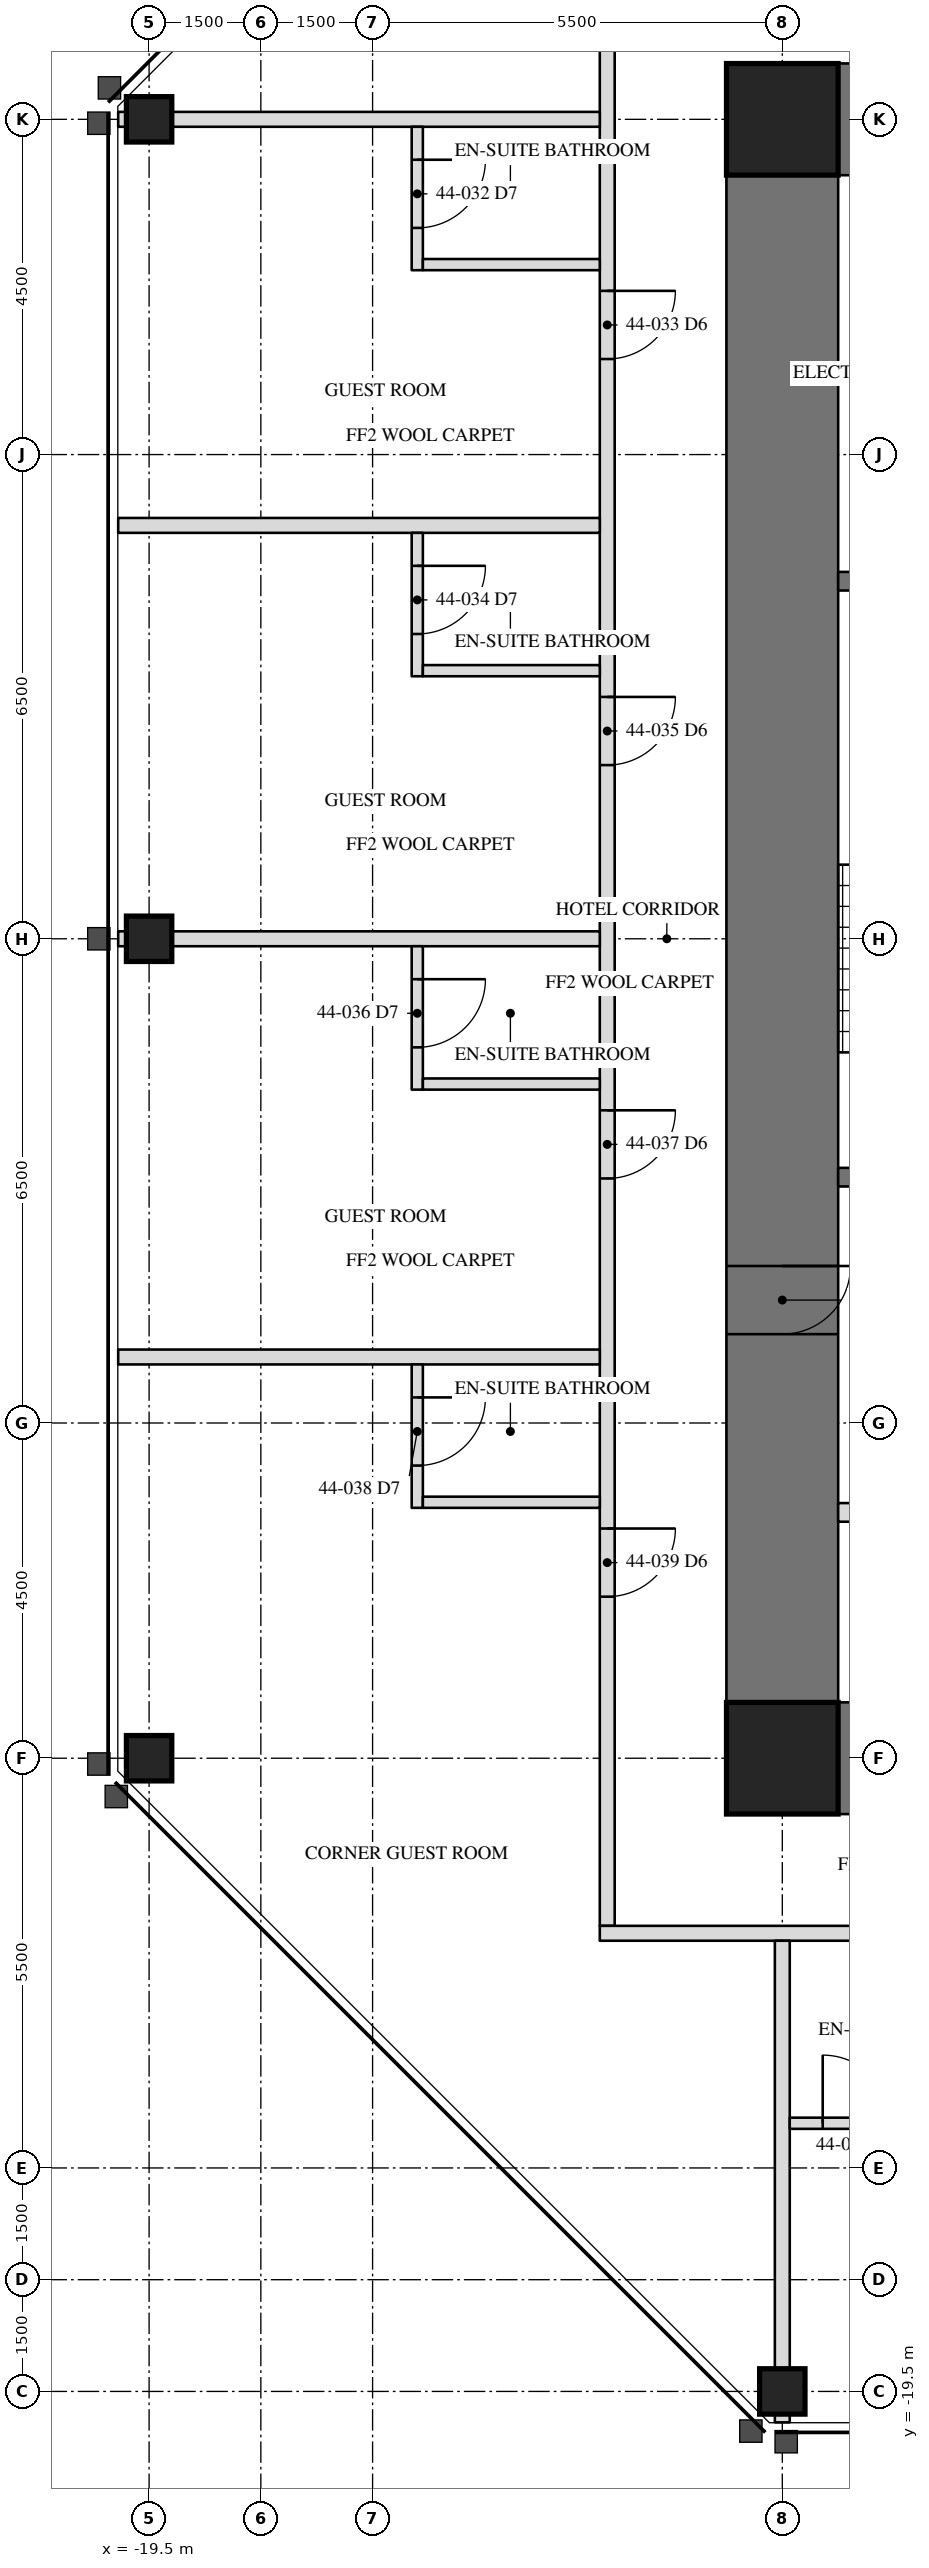
"""IFC4 building model, lengths in metres.
Left out: names, types, materials, properties, quantities, classifications, styles, units other than length and angle.
Written with IfcOpenShell. Run it as: python <this file> out.ifc"""

import sys

from ifc_helpers import new_model, si_unit, direction, frame, frame_2d, origin, origin_2d, place, context, subcontext, project, spatial, rectangle, hollow_rectangle, extrude, element, fill, save


model = new_model("IFC4")
c1 = context("Model", 3, precision=1e-05, world=origin(), true_north=direction((0.0, 1.0)))
c2 = subcontext(c1, "Body", "Model", "MODEL_VIEW")
j1 = project(units=[si_unit("LENGTHUNIT", "METRE"), si_unit("PLANEANGLEUNIT", "RADIAN")], contexts=[c1])
p1 = place(None, origin())
s1 = spatial("IfcSite", under=j1, at=p1, CompositionType="ELEMENT")
p2 = place(p1, origin())
s2 = spatial("IfcBuilding", under=s1, at=p2, CompositionType="ELEMENT")
p3 = place(p2, frame((0.0, 0.0, 190.7)))
s3 = spatial("IfcBuildingStorey", under=s2, at=p3, CompositionType="ELEMENT", Elevation=190.7)
for number, where, z_axis, x_axis in (
    (1, (-19.5, 0.0, 0.0), (0.0, 0.0, 1.0), (0.0, 1.0, 0.0)),
    (2, (-19.5, -11.0, 0.0), (0.0, 0.0, 1.0), (0.0, 1.0, 0.0)),
    (3, (-11.0, -19.5, 0.0), (0.0, 0.0, 1.0), (1.0, 0.0, 0.0)),
    (4, (-19.5, 11.0, 0.0), (0.0, 0.0, 1.0), (0.0, 1.0, 0.0)),
):
    element("IfcColumn", number, at=place(p3, frame(where, z_axis=z_axis, x_axis=x_axis)), inside=s3, PredefinedType="COLUMN", context=c2, shape_type="SweptSolid", body=[
        extrude(hollow_rectangle(XDim=0.61, YDim=0.61, WallThickness=0.076, at=origin_2d()), origin(), (0.0, 0.0, 1.0), 3.5),
    ])
p4 = place(p3, frame((-11.0, 11.0, 0.0), z_axis=(0.0, 0.0, 1.0), x_axis=(0.0, -1.0, 0.0)))
e5 = element("IfcWall", 5, at=p4, inside=s3, PredefinedType="SHEAR", context=c2, shape_type="SweptSolid", body=[
    extrude(rectangle(XDim=22.0, YDim=1.5, at=frame_2d((11.0, 0.0))), origin(), (0.0, 0.0, 1.0), 3.5),
])
p5 = place(p4, frame((15.393, 0.0, 0.0)))
e6 = element("IfcOpeningElement", 6, at=p5, cuts=e5, PredefinedType="OPENING", context=c2, shape_type="SweptSolid", body=[
    extrude(rectangle(XDim=0.915, YDim=2.134, at=frame_2d((0.458, 1.067))), frame((0.0, 0.76, 0.0), z_axis=(0.0, -1.0, 0.0), x_axis=(1.0, 0.0, 0.0)), (0.0, 0.0, 1.0), 1.52),
])
for number, where, z_axis, x_axis in (
    (7, (-6.5, 11.0, 0.0), (0.0, 0.0, 1.0), (-1.0, 0.0, 0.0)),
    (8, (-11.0, -11.0, 0.0), (0.0, 0.0, 1.0), (1.0, 0.0, 0.0)),
):
    element("IfcWall", number, at=place(p3, frame(where, z_axis=z_axis, x_axis=x_axis)), inside=s3, PredefinedType="SHEAR", context=c2, shape_type="SweptSolid", body=[
        extrude(rectangle(XDim=4.5, YDim=1.5, at=frame_2d((2.25, 0.0))), origin(), (0.0, 0.0, 1.0), 3.5),
    ])
for number, where, z_axis, x_axis in (
    (9, (-11.0, 11.0, 0.0), (0.0, 0.0, 1.0), (1.0, 0.0, 0.0)),
    (10, (-11.0, -11.0, 0.0), (0.0, 0.0, 1.0), (1.0, 0.0, 0.0)),
):
    element("IfcColumn", number, at=place(p3, frame(where, z_axis=z_axis, x_axis=x_axis)), inside=s3, PredefinedType="COLUMN", context=c2, shape_type="SweptSolid", body=[
        extrude(hollow_rectangle(XDim=1.499, YDim=1.499, WallThickness=0.102, at=origin_2d()), origin(), (0.0, 0.0, 1.0), 3.5),
    ])
p6 = place(p3, frame((-6.95, 4.8, 0.0), z_axis=(0.0, 0.0, 1.0), x_axis=(-1.0, 0.0, 0.0)))
e11 = element("IfcWall", 11, at=p6, inside=s3, PredefinedType="SOLIDWALL", context=c2, shape_type="SweptSolid", body=[
    extrude(rectangle(XDim=3.3, YDim=0.25, at=frame_2d((1.65, 0.0))), origin(), (0.0, 0.0, 1.0), 3.31),
])
p7 = place(p3, frame((-6.95, -3.2, 0.0), z_axis=(0.0, 0.0, 1.0), x_axis=(-1.0, 0.0, 0.0)))
e12 = element("IfcWall", 12, at=p7, inside=s3, PredefinedType="SOLIDWALL", context=c2, shape_type="SweptSolid", body=[
    extrude(rectangle(XDim=3.3, YDim=0.25, at=frame_2d((1.65, 0.0))), origin(), (0.0, 0.0, 1.0), 3.31),
])
p8 = place(p7, frame((1.116, 0.0, 0.0)))
e13 = element("IfcOpeningElement", 13, at=p8, cuts=e12, PredefinedType="OPENING", context=c2, shape_type="SweptSolid", body=[
    extrude(rectangle(XDim=1.067, YDim=2.134, at=frame_2d((0.533, 1.067))), frame((0.0, 0.135, 0.0), z_axis=(0.0, -1.0, 0.0), x_axis=(1.0, 0.0, 0.0)), (0.0, 0.0, 1.0), 0.27),
])
p9 = place(p3, frame((-6.95, -7.7, 0.0), z_axis=(0.0, 0.0, 1.0), x_axis=(-1.0, 0.0, 0.0)))
e14 = element("IfcWall", 14, at=p9, inside=s3, PredefinedType="PARTITIONING", context=c2, shape_type="SweptSolid", body=[
    extrude(rectangle(XDim=3.3, YDim=0.25, at=frame_2d((1.65, 0.0))), origin(), (0.0, 0.0, 1.0), 3.31),
])
p10 = place(p9, frame((0.45, 0.0, 0.0)))
e15 = element("IfcOpeningElement", 15, at=p10, cuts=e14, PredefinedType="OPENING", context=c2, shape_type="SweptSolid", body=[
    extrude(rectangle(XDim=1.219, YDim=2.134, at=frame_2d((0.609, 1.067))), frame((0.0, 0.135, 0.0), z_axis=(0.0, -1.0, 0.0), x_axis=(1.0, 0.0, 0.0)), (0.0, 0.0, 1.0), 0.27),
])
p11 = place(p3, frame((-13.35, 13.45, 0.0), z_axis=(0.0, 0.0, 1.0), x_axis=(0.0, -1.0, 0.0)))
e16 = element("IfcWall", 16, at=p11, inside=s3, PredefinedType="PARTITIONING", context=c2, shape_type="SweptSolid", body=[
    extrude(rectangle(XDim=26.7, YDim=0.2, at=frame_2d((13.35, 0.0))), origin(), (0.0, 0.0, 1.0), 3.31),
])
p12 = place(p11, frame((4.752, 0.0, 0.0)))
e17 = element("IfcOpeningElement", 17, at=p12, cuts=e16, PredefinedType="OPENING", context=c2, shape_type="SweptSolid", body=[
    extrude(rectangle(XDim=0.915, YDim=2.134, at=frame_2d((0.458, 1.067))), frame((0.0, 0.11, 0.0), z_axis=(0.0, -1.0, 0.0), x_axis=(1.0, 0.0, 0.0)), (0.0, 0.0, 1.0), 0.22),
])
p13 = place(p11, frame((10.204, 0.0, 0.0)))
e18 = element("IfcOpeningElement", 18, at=p13, cuts=e16, PredefinedType="OPENING", context=c2, shape_type="SweptSolid", body=[
    extrude(rectangle(XDim=0.915, YDim=2.134, at=frame_2d((0.458, 1.067))), frame((0.0, 0.11, 0.0), z_axis=(0.0, -1.0, 0.0), x_axis=(1.0, 0.0, 0.0)), (0.0, 0.0, 1.0), 0.22),
])
p14 = place(p11, frame((15.752, 0.0, 0.0)))
e19 = element("IfcOpeningElement", 19, at=p14, cuts=e16, PredefinedType="OPENING", context=c2, shape_type="SweptSolid", body=[
    extrude(rectangle(XDim=0.915, YDim=2.134, at=frame_2d((0.458, 1.067))), frame((0.0, 0.11, 0.0), z_axis=(0.0, -1.0, 0.0), x_axis=(1.0, 0.0, 0.0)), (0.0, 0.0, 1.0), 0.22),
])
p15 = place(p11, frame((21.366, 0.0, 0.0)))
e20 = element("IfcOpeningElement", 20, at=p15, cuts=e16, PredefinedType="OPENING", context=c2, shape_type="SweptSolid", body=[
    extrude(rectangle(XDim=0.915, YDim=2.134, at=frame_2d((0.458, 1.067))), frame((0.0, 0.11, 0.0), z_axis=(0.0, -1.0, 0.0), x_axis=(1.0, 0.0, 0.0)), (0.0, 0.0, 1.0), 0.22),
])
p16 = place(p3, frame((-13.45, -13.35, 0.0), z_axis=(0.0, 0.0, 1.0), x_axis=(1.0, 0.0, 0.0)))
e21 = element("IfcWall", 21, at=p16, inside=s3, PredefinedType="PARTITIONING", context=c2, shape_type="SweptSolid", body=[
    extrude(rectangle(XDim=26.7, YDim=0.2, at=frame_2d((13.35, 0.0))), origin(), (0.0, 0.0, 1.0), 3.31),
])
p17 = place(p16, frame((4.752, 0.0, 0.0)))
e22 = element("IfcOpeningElement", 22, at=p17, cuts=e21, PredefinedType="OPENING", context=c2, shape_type="SweptSolid", body=[
    extrude(rectangle(XDim=0.915, YDim=2.134, at=frame_2d((0.458, 1.067))), frame((0.0, 0.11, 0.0), z_axis=(0.0, -1.0, 0.0), x_axis=(1.0, 0.0, 0.0)), (0.0, 0.0, 1.0), 0.22),
])
p18 = place(p16, frame((10.204, 0.0, 0.0)))
e23 = element("IfcOpeningElement", 23, at=p18, cuts=e21, PredefinedType="OPENING", context=c2, shape_type="SweptSolid", body=[
    extrude(rectangle(XDim=0.915, YDim=2.134, at=frame_2d((0.458, 1.067))), frame((0.0, 0.11, 0.0), z_axis=(0.0, -1.0, 0.0), x_axis=(1.0, 0.0, 0.0)), (0.0, 0.0, 1.0), 0.22),
])
p19 = place(p16, frame((15.752, 0.0, 0.0)))
e24 = element("IfcOpeningElement", 24, at=p19, cuts=e21, PredefinedType="OPENING", context=c2, shape_type="SweptSolid", body=[
    extrude(rectangle(XDim=0.915, YDim=2.134, at=frame_2d((0.458, 1.067))), frame((0.0, 0.11, 0.0), z_axis=(0.0, -1.0, 0.0), x_axis=(1.0, 0.0, 0.0)), (0.0, 0.0, 1.0), 0.22),
])
p20 = place(p16, frame((21.967, 0.0, 0.0)))
e25 = element("IfcOpeningElement", 25, at=p20, cuts=e21, PredefinedType="OPENING", context=c2, shape_type="SweptSolid", body=[
    extrude(rectangle(XDim=0.915, YDim=2.134, at=frame_2d((0.458, 1.067))), frame((0.0, 0.11, 0.0), z_axis=(0.0, -1.0, 0.0), x_axis=(1.0, 0.0, 0.0)), (0.0, 0.0, 1.0), 0.22),
])
p21 = place(p3, frame((-13.45, 11.0, 0.0), z_axis=(0.0, 0.0, 1.0), x_axis=(-1.0, 0.0, 0.0)))
e26 = element("IfcWall", 26, at=p21, inside=s3, PredefinedType="PARTITIONING", context=c2, shape_type="SweptSolid", body=[
    extrude(rectangle(XDim=6.465, YDim=0.2, at=frame_2d((3.232, 0.0))), origin(), (0.0, 0.0, 1.0), 2.802),
])
p22 = place(p3, frame((-13.45, 5.549, 0.0), z_axis=(0.0, 0.0, 1.0), x_axis=(-1.0, 0.0, 0.0)))
e27 = element("IfcWall", 27, at=p22, inside=s3, PredefinedType="PARTITIONING", context=c2, shape_type="SweptSolid", body=[
    extrude(rectangle(XDim=6.465, YDim=0.2, at=frame_2d((3.232, 0.0))), origin(), (0.0, 0.0, 1.0), 3.31),
])
p23 = place(p3, frame((-13.45, 0.0, 0.0), z_axis=(0.0, 0.0, 1.0), x_axis=(-1.0, 0.0, 0.0)))
e28 = element("IfcWall", 28, at=p23, inside=s3, PredefinedType="PARTITIONING", context=c2, shape_type="SweptSolid", body=[
    extrude(rectangle(XDim=6.465, YDim=0.2, at=frame_2d((3.232, 0.0))), origin(), (0.0, 0.0, 1.0), 2.802),
])
p24 = place(p3, frame((-13.45, -5.614, 0.0), z_axis=(0.0, 0.0, 1.0), x_axis=(-1.0, 0.0, 0.0)))
e29 = element("IfcWall", 29, at=p24, inside=s3, PredefinedType="PARTITIONING", context=c2, shape_type="SweptSolid", body=[
    extrude(rectangle(XDim=6.465, YDim=0.2, at=frame_2d((3.232, 0.0))), origin(), (0.0, 0.0, 1.0), 3.31),
])
p25 = place(p3, frame((-15.9, 10.9, 0.0), z_axis=(0.0, 0.0, 1.0), x_axis=(0.0, -1.0, 0.0)))
e30 = element("IfcWall", 30, at=p25, inside=s3, PredefinedType="PARTITIONING", context=c2, shape_type="SweptSolid", body=[
    extrude(rectangle(XDim=1.925, YDim=0.15, at=frame_2d((0.962, 0.0))), origin(), (0.0, 0.0, 1.0), 3.31),
])
p26 = place(p25, frame((0.442, 0.0, 0.0)))
e31 = element("IfcOpeningElement", 31, at=p26, cuts=e30, PredefinedType="OPENING", context=c2, shape_type="SweptSolid", body=[
    extrude(rectangle(XDim=0.915, YDim=2.032, at=frame_2d((0.458, 1.016))), frame((0.0, 0.085, 0.0), z_axis=(0.0, -1.0, 0.0), x_axis=(1.0, 0.0, 0.0)), (0.0, 0.0, 1.0), 0.17),
])
p27 = place(p3, frame((-13.45, 9.05, 0.0), z_axis=(0.0, 0.0, 1.0), x_axis=(-1.0, 0.0, 0.0)))
e32 = element("IfcWall", 32, at=p27, inside=s3, PredefinedType="PARTITIONING", context=c2, shape_type="SweptSolid", body=[
    extrude(rectangle(XDim=2.375, YDim=0.15, at=frame_2d((1.188, 0.0))), origin(), (0.0, 0.0, 1.0), 3.31),
])
p28 = place(p3, frame((-15.9, 5.449, 0.0), z_axis=(0.0, 0.0, 1.0), x_axis=(0.0, -1.0, 0.0)))
e33 = element("IfcWall", 33, at=p28, inside=s3, PredefinedType="PARTITIONING", context=c2, shape_type="SweptSolid", body=[
    extrude(rectangle(XDim=1.925, YDim=0.15, at=frame_2d((0.962, 0.0))), origin(), (0.0, 0.0, 1.0), 3.31),
])
p29 = place(p28, frame((0.442, 0.0, 0.0)))
e34 = element("IfcOpeningElement", 34, at=p29, cuts=e33, PredefinedType="OPENING", context=c2, shape_type="SweptSolid", body=[
    extrude(rectangle(XDim=0.915, YDim=2.032, at=frame_2d((0.458, 1.016))), frame((0.0, 0.085, 0.0), z_axis=(0.0, -1.0, 0.0), x_axis=(1.0, 0.0, 0.0)), (0.0, 0.0, 1.0), 0.17),
])
p30 = place(p3, frame((-13.45, 3.599, 0.0), z_axis=(0.0, 0.0, 1.0), x_axis=(-1.0, 0.0, 0.0)))
e35 = element("IfcWall", 35, at=p30, inside=s3, PredefinedType="PARTITIONING", context=c2, shape_type="SweptSolid", body=[
    extrude(rectangle(XDim=2.375, YDim=0.15, at=frame_2d((1.188, 0.0))), origin(), (0.0, 0.0, 1.0), 2.703),
])
p31 = place(p3, frame((-15.9, -0.1, 0.0), z_axis=(0.0, 0.0, 1.0), x_axis=(0.0, -1.0, 0.0)))
e36 = element("IfcWall", 36, at=p31, inside=s3, PredefinedType="PARTITIONING", context=c2, shape_type="SweptSolid", body=[
    extrude(rectangle(XDim=1.925, YDim=0.15, at=frame_2d((0.962, 0.0))), origin(), (0.0, 0.0, 1.0), 3.31),
])
p32 = place(p31, frame((0.442, 0.0, 0.0)))
e37 = element("IfcOpeningElement", 37, at=p32, cuts=e36, PredefinedType="OPENING", context=c2, shape_type="SweptSolid", body=[
    extrude(rectangle(XDim=0.915, YDim=2.032, at=frame_2d((0.458, 1.016))), frame((0.0, 0.085, 0.0), z_axis=(0.0, -1.0, 0.0), x_axis=(1.0, 0.0, 0.0)), (0.0, 0.0, 1.0), 0.17),
])
p33 = place(p3, frame((-13.45, -1.95, 0.0), z_axis=(0.0, 0.0, 1.0), x_axis=(-1.0, 0.0, 0.0)))
e38 = element("IfcWall", 38, at=p33, inside=s3, PredefinedType="PARTITIONING", context=c2, shape_type="SweptSolid", body=[
    extrude(rectangle(XDim=2.375, YDim=0.15, at=frame_2d((1.188, 0.0))), origin(), (0.0, 0.0, 1.0), 3.31),
])
p34 = place(p3, frame((-15.9, -5.714, 0.0), z_axis=(0.0, 0.0, 1.0), x_axis=(0.0, -1.0, 0.0)))
e39 = element("IfcWall", 39, at=p34, inside=s3, PredefinedType="PARTITIONING", context=c2, shape_type="SweptSolid", body=[
    extrude(rectangle(XDim=1.925, YDim=0.15, at=frame_2d((0.962, 0.0))), origin(), (0.0, 0.0, 1.0), 3.31),
])
p35 = place(p34, frame((0.442, 0.0, 0.0)))
e40 = element("IfcOpeningElement", 40, at=p35, cuts=e39, PredefinedType="OPENING", context=c2, shape_type="SweptSolid", body=[
    extrude(rectangle(XDim=0.915, YDim=2.032, at=frame_2d((0.458, 1.016))), frame((0.0, 0.085, 0.0), z_axis=(0.0, -1.0, 0.0), x_axis=(1.0, 0.0, 0.0)), (0.0, 0.0, 1.0), 0.17),
])
p36 = place(p3, frame((-13.45, -7.564, 0.0), z_axis=(0.0, 0.0, 1.0), x_axis=(-1.0, 0.0, 0.0)))
e41 = element("IfcWall", 41, at=p36, inside=s3, PredefinedType="PARTITIONING", context=c2, shape_type="SweptSolid", body=[
    extrude(rectangle(XDim=2.375, YDim=0.15, at=frame_2d((1.188, 0.0))), origin(), (0.0, 0.0, 1.0), 3.31),
])
p37 = place(p3, frame((-11.0, -13.45, 0.0), z_axis=(0.0, 0.0, 1.0), x_axis=(0.0, -1.0, 0.0)))
e42 = element("IfcWall", 42, at=p37, inside=s3, PredefinedType="PARTITIONING", context=c2, shape_type="SweptSolid", body=[
    extrude(rectangle(XDim=6.465, YDim=0.2, at=frame_2d((3.232, 0.0))), origin(), (0.0, 0.0, 1.0), 2.802),
])
p38 = place(p3, frame((-10.9, -15.9, 0.0), z_axis=(0.0, 0.0, 1.0), x_axis=(1.0, 0.0, 0.0)))
e43 = element("IfcWall", 43, at=p38, inside=s3, PredefinedType="PARTITIONING", context=c2, shape_type="SweptSolid", body=[
    extrude(rectangle(XDim=1.925, YDim=0.15, at=frame_2d((0.962, 0.0))), origin(), (0.0, 0.0, 1.0), 3.31),
])
p39 = place(p38, frame((0.442, 0.0, 0.0)))
e44 = element("IfcOpeningElement", 44, at=p39, cuts=e43, PredefinedType="OPENING", context=c2, shape_type="SweptSolid", body=[
    extrude(rectangle(XDim=0.915, YDim=2.032, at=frame_2d((0.458, 1.016))), frame((0.0, 0.085, 0.0), z_axis=(0.0, -1.0, 0.0), x_axis=(1.0, 0.0, 0.0)), (0.0, 0.0, 1.0), 0.17),
])
p40 = place(p5, origin())
e45 = element("IfcDoor", 45, at=p40, inside=s3, OperationType="SINGLE_SWING_RIGHT", PredefinedType="DOOR", context=c2, shape_type="SweptSolid", body=[
    extrude(rectangle(XDim=0.915, YDim=2.134, at=frame_2d((0.458, 1.067))), frame((0.0, -0.675, 0.0), z_axis=(0.0, -1.0, 0.0), x_axis=(1.0, 0.0, 0.0)), (0.0, 0.0, 1.0), 0.05),
])
fill(e6, e45)
p41 = place(p26, origin())
e46 = element("IfcDoor", 46, at=p41, inside=s3, OperationType="SINGLE_SWING_LEFT", PredefinedType="DOOR", context=c2, shape_type="SweptSolid", body=[
    extrude(rectangle(XDim=0.915, YDim=2.032, at=frame_2d((0.458, 1.016))), frame((0.0, 0.025, 0.0), z_axis=(0.0, -1.0, 0.0), x_axis=(1.0, 0.0, 0.0)), (0.0, 0.0, 1.0), 0.05),
])
fill(e31, e46)
p42 = place(p12, origin())
e47 = element("IfcDoor", 47, at=p42, inside=s3, OperationType="SINGLE_SWING_LEFT", PredefinedType="DOOR", context=c2, shape_type="SweptSolid", body=[
    extrude(rectangle(XDim=0.915, YDim=2.134, at=frame_2d((0.458, 1.067))), frame((0.0, 0.025, 0.0), z_axis=(0.0, -1.0, 0.0), x_axis=(1.0, 0.0, 0.0)), (0.0, 0.0, 1.0), 0.05),
])
fill(e17, e47)
p43 = place(p29, origin())
e48 = element("IfcDoor", 48, at=p43, inside=s3, OperationType="SINGLE_SWING_LEFT", PredefinedType="DOOR", context=c2, shape_type="SweptSolid", body=[
    extrude(rectangle(XDim=0.915, YDim=2.032, at=frame_2d((0.458, 1.016))), frame((0.0, 0.025, 0.0), z_axis=(0.0, -1.0, 0.0), x_axis=(1.0, 0.0, 0.0)), (0.0, 0.0, 1.0), 0.05),
])
fill(e34, e48)
p44 = place(p13, origin())
e49 = element("IfcDoor", 49, at=p44, inside=s3, OperationType="SINGLE_SWING_LEFT", PredefinedType="DOOR", context=c2, shape_type="SweptSolid", body=[
    extrude(rectangle(XDim=0.915, YDim=2.134, at=frame_2d((0.458, 1.067))), frame((0.0, 0.025, 0.0), z_axis=(0.0, -1.0, 0.0), x_axis=(1.0, 0.0, 0.0)), (0.0, 0.0, 1.0), 0.05),
])
fill(e18, e49)
p45 = place(p32, origin())
e50 = element("IfcDoor", 50, at=p45, inside=s3, OperationType="SINGLE_SWING_LEFT", PredefinedType="DOOR", context=c2, shape_type="SweptSolid", body=[
    extrude(rectangle(XDim=0.915, YDim=2.032, at=frame_2d((0.458, 1.016))), frame((0.0, 0.025, 0.0), z_axis=(0.0, -1.0, 0.0), x_axis=(1.0, 0.0, 0.0)), (0.0, 0.0, 1.0), 0.05),
])
fill(e37, e50)
p46 = place(p14, origin())
e51 = element("IfcDoor", 51, at=p46, inside=s3, OperationType="SINGLE_SWING_LEFT", PredefinedType="DOOR", context=c2, shape_type="SweptSolid", body=[
    extrude(rectangle(XDim=0.915, YDim=2.134, at=frame_2d((0.458, 1.067))), frame((0.0, 0.025, 0.0), z_axis=(0.0, -1.0, 0.0), x_axis=(1.0, 0.0, 0.0)), (0.0, 0.0, 1.0), 0.05),
])
fill(e19, e51)
p47 = place(p35, origin())
e52 = element("IfcDoor", 52, at=p47, inside=s3, OperationType="SINGLE_SWING_LEFT", PredefinedType="DOOR", context=c2, shape_type="SweptSolid", body=[
    extrude(rectangle(XDim=0.915, YDim=2.032, at=frame_2d((0.458, 1.016))), frame((0.0, 0.025, 0.0), z_axis=(0.0, -1.0, 0.0), x_axis=(1.0, 0.0, 0.0)), (0.0, 0.0, 1.0), 0.05),
])
fill(e40, e52)
p48 = place(p15, origin())
e53 = element("IfcDoor", 53, at=p48, inside=s3, OperationType="SINGLE_SWING_LEFT", PredefinedType="DOOR", context=c2, shape_type="SweptSolid", body=[
    extrude(rectangle(XDim=0.915, YDim=2.134, at=frame_2d((0.458, 1.067))), frame((0.0, 0.025, 0.0), z_axis=(0.0, -1.0, 0.0), x_axis=(1.0, 0.0, 0.0)), (0.0, 0.0, 1.0), 0.05),
])
fill(e20, e53)
p49 = place(p39, origin())
e54 = element("IfcDoor", 54, at=p49, inside=s3, OperationType="SINGLE_SWING_LEFT", PredefinedType="DOOR", context=c2, shape_type="SweptSolid", body=[
    extrude(rectangle(XDim=0.915, YDim=2.032, at=frame_2d((0.458, 1.016))), frame((0.0, 0.025, 0.0), z_axis=(0.0, -1.0, 0.0), x_axis=(1.0, 0.0, 0.0)), (0.0, 0.0, 1.0), 0.05),
])
fill(e44, e54)
save(model, sys.argv[1])
